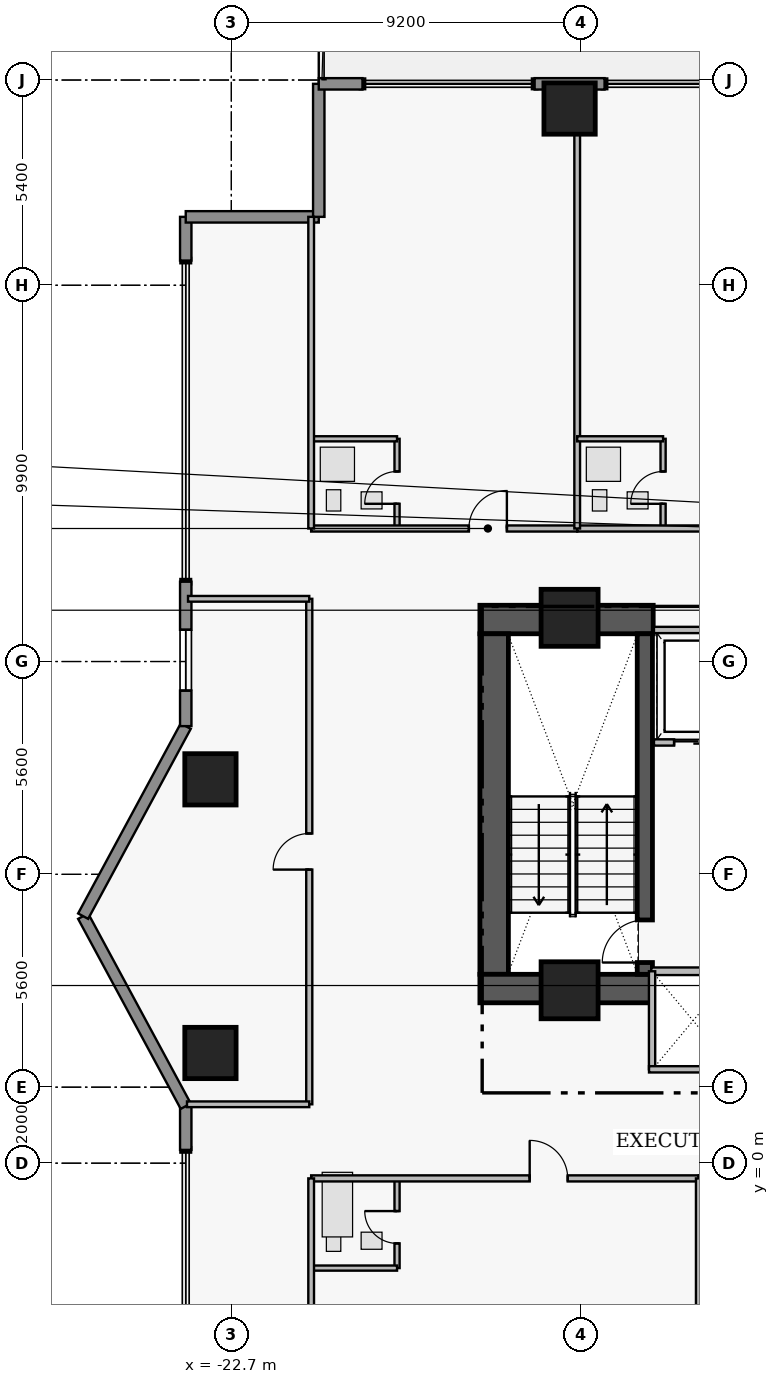
"""IFC4 building model, lengths in metres.
Left out: names, types, materials, properties, quantities, classifications, styles, units other than length and angle.
Written with IfcOpenShell. Run it as: python <this file> out.ifc"""

import sys

from ifc_helpers import new_model, si_unit, direction, frame, frame_2d, origin, origin_2d, place, context, subcontext, project, spatial, rectangle, extrude, element, fill, save


model = new_model("IFC4")
c1 = context("Model", 3, precision=1e-05, world=origin(), true_north=direction((0.0, 1.0)))
c2 = subcontext(c1, "Body", "Model", "MODEL_VIEW")
j1 = project(units=[si_unit("LENGTHUNIT", "METRE"), si_unit("PLANEANGLEUNIT", "RADIAN")], contexts=[c1])
p1 = place(None, origin())
s1 = spatial("IfcSite", under=j1, at=p1, CompositionType="ELEMENT")
p2 = place(p1, origin())
s2 = spatial("IfcBuilding", under=s1, at=p2, CompositionType="ELEMENT")
p3 = place(p2, frame((0.0, 0.0, 132.15)))
s3 = spatial("IfcBuildingStorey", under=s2, at=p3, CompositionType="ELEMENT", Elevation=132.15)
p4 = place(p3, frame((-16.16, 14.305, 0.0), z_axis=(0.0, 0.0, 1.0), x_axis=(1.0, 0.0, 0.0)))
e1 = element("IfcWall", 1, at=p4, inside=s3, PredefinedType="SHEAR", context=c2, shape_type="SweptSolid", body=[
    extrude(rectangle(XDim=4.56, YDim=0.75, at=frame_2d((2.28, 0.0))), origin(), (0.0, 0.0, 1.0), 3.46),
])
p5 = place(p3, frame((-15.785, 4.97, 0.0), z_axis=(0.0, 0.0, 1.0), x_axis=(0.0, 1.0, 0.0)))
e2 = element("IfcWall", 2, at=p5, inside=s3, PredefinedType="SHEAR", context=c2, shape_type="SweptSolid", body=[
    extrude(rectangle(XDim=8.96, YDim=0.75, at=frame_2d((4.48, 0.0))), origin(), (0.0, 0.0, 1.0), 3.46),
])
p6 = place(p3, frame((-16.16, 4.595, 0.0), z_axis=(0.0, 0.0, 1.0), x_axis=(1.0, 0.0, 0.0)))
e3 = element("IfcWall", 3, at=p6, inside=s3, PredefinedType="SHEAR", context=c2, shape_type="SweptSolid", body=[
    extrude(rectangle(XDim=4.56, YDim=0.75, at=frame_2d((2.28, 0.0))), origin(), (0.0, 0.0, 1.0), 3.46),
])
p7 = place(p3, frame((-11.82, 4.97, 0.0), z_axis=(0.0, 0.0, 1.0), x_axis=(0.0, 1.0, 0.0)))
e4 = element("IfcWall", 4, at=p7, inside=s3, PredefinedType="SHEAR", context=c2, shape_type="SweptSolid", body=[
    extrude(rectangle(XDim=8.96, YDim=0.4, at=frame_2d((4.48, 0.0))), origin(), (0.0, 0.0, 1.0), 3.46),
])
p8 = place(p7, frame((0.31, 0.0, 0.0)))
e5 = element("IfcOpeningElement", 5, at=p8, cuts=e4, PredefinedType="OPENING", context=c2, shape_type="SweptSolid", body=[
    extrude(rectangle(XDim=1.12, YDim=2.22, at=frame_2d((0.56, 1.11))), frame((0.0, 0.21, 0.0), z_axis=(0.0, -1.0, 0.0), x_axis=(1.0, 0.0, 0.0)), (0.0, 0.0, 1.0), 0.42),
])
for number, where, z_axis, x_axis in (
    (6, (-13.8, 14.35, 0.0), (0.0, 0.0, 1.0), (1.0, 0.0, 0.0)),
    (7, (-13.8, 4.55, 0.0), (0.0, 0.0, 1.0), (1.0, 0.0, 0.0)),
):
    element("IfcColumn", number, at=place(p3, frame(where, z_axis=z_axis, x_axis=x_axis)), inside=s3, PredefinedType="COLUMN", context=c2, shape_type="SweptSolid", body=[
        extrude(rectangle(XDim=1.5, YDim=1.5, at=origin_2d()), origin(), (0.0, 0.0, 1.0), 3.65),
    ])
for number, where, z_axis, x_axis in (
    (8, (-13.8, 27.75, 0.0), (0.0, 0.0, 1.0), (1.0, 0.0, 0.0)),
    (9, (-23.25, 2.9, 0.0), (0.0, 0.0, 1.0), (1.0, 0.0, 0.0)),
    (10, (-23.25, 10.1, 0.0), (0.0, 0.0, 1.0), (1.0, 0.0, 0.0)),
):
    element("IfcColumn", number, at=place(p3, frame(where, z_axis=z_axis, x_axis=x_axis)), inside=s3, PredefinedType="COLUMN", context=c2, shape_type="SweptSolid", body=[
        extrude(rectangle(XDim=1.35, YDim=1.35, at=origin_2d()), origin(), (0.0, 0.0, 1.0), 3.65),
    ])
p9 = place(p3, frame((-23.9, 0.35, 0.0), z_axis=(0.0, 0.0, 1.0), x_axis=(0.0, 1.0, 0.0)))
e11 = element("IfcWall", 11, at=p9, inside=s3, PredefinedType="STANDARD", context=c2, shape_type="SweptSolid", body=[
    extrude(rectangle(XDim=1.15, YDim=0.3, at=frame_2d((0.575, 0.0))), origin(), (0.0, 0.0, 1.0), 3.43),
])
for number, where, z_axis, x_axis in (
    (12, (-23.9, 1.5, 0.0), (0.0, 0.0, 1.0), (-0.475, 0.88, 0.0)),
    (13, (-26.6, 6.5, 0.0), (0.0, 0.0, 1.0), (0.475, 0.88, 0.0)),
):
    element("IfcWall", number, at=place(p3, frame(where, z_axis=z_axis, x_axis=x_axis)), inside=s3, PredefinedType="STANDARD", context=c2, shape_type="SweptSolid", body=[
        extrude(rectangle(XDim=5.683, YDim=0.3, at=frame_2d((2.841, 0.0))), origin(), (0.0, 0.0, 1.0), 3.43),
    ])
p10 = place(p3, frame((-23.9, 11.5, 0.0), z_axis=(0.0, 0.0, 1.0), x_axis=(0.0, 1.0, 0.0)))
e14 = element("IfcWall", 14, at=p10, inside=s3, PredefinedType="STANDARD", context=c2, shape_type="SweptSolid", body=[
    extrude(rectangle(XDim=3.8, YDim=0.3, at=frame_2d((1.9, 0.0))), origin(), (0.0, 0.0, 1.0), 3.43),
])
p11 = place(p10, frame((0.935, 0.0, 0.85)))
e15 = element("IfcOpeningElement", 15, at=p11, cuts=e14, PredefinedType="OPENING", context=c2, shape_type="SweptSolid", body=[
    extrude(rectangle(XDim=1.6, YDim=1.8, at=frame_2d((0.8, 0.9))), frame((0.0, 0.16, 0.0), z_axis=(0.0, -1.0, 0.0), x_axis=(1.0, 0.0, 0.0)), (0.0, 0.0, 1.0), 0.32),
])
p12 = place(p3, frame((-23.9, 23.75, 0.0), z_axis=(0.0, 0.0, 1.0), x_axis=(0.0, 1.0, 0.0)))
e16 = element("IfcWall", 16, at=p12, inside=s3, PredefinedType="STANDARD", context=c2, shape_type="SweptSolid", body=[
    extrude(rectangle(XDim=1.15, YDim=0.3, at=frame_2d((0.575, 0.0))), origin(), (0.0, 0.0, 1.0), 3.43),
])
for number, where, z_axis, x_axis in (
    (17, (-23.9, 24.9, 0.0), (0.0, 0.0, 1.0), (1.0, 0.0, 0.0)),
    (18, (-20.4, 24.9, 0.0), (0.0, 0.0, 1.0), (0.0, 1.0, 0.0)),
):
    element("IfcWall", number, at=place(p3, frame(where, z_axis=z_axis, x_axis=x_axis)), inside=s3, PredefinedType="STANDARD", context=c2, shape_type="SweptSolid", body=[
        extrude(rectangle(XDim=3.5, YDim=0.3, at=frame_2d((1.75, 0.0))), origin(), (0.0, 0.0, 1.0), 3.43),
    ])
p13 = place(p3, frame((-20.4, 28.4, 0.0), z_axis=(0.0, 0.0, 1.0), x_axis=(1.0, 0.0, 0.0)))
e19 = element("IfcWall", 19, at=p13, inside=s3, PredefinedType="STANDARD", context=c2, shape_type="SweptSolid", body=[
    extrude(rectangle(XDim=1.15, YDim=0.3, at=frame_2d((0.575, 0.0))), origin(), (0.0, 0.0, 1.0), 3.43),
])
p14 = place(p3, frame((-14.72, 28.4, 0.0), z_axis=(0.0, 0.0, 1.0), x_axis=(1.0, 0.0, 0.0)))
e20 = element("IfcWall", 20, at=p14, inside=s3, PredefinedType="STANDARD", context=c2, shape_type="SweptSolid", body=[
    extrude(rectangle(XDim=1.84, YDim=0.3, at=frame_2d((0.92, 0.0))), origin(), (0.0, 0.0, 1.0), 3.43),
])
p15 = place(p3, frame((-11.58, 11.07, 0.0), z_axis=(0.0, 0.0, 1.0), x_axis=(1.0, 0.0, 0.0)))
e21 = element("IfcWall", 21, at=p15, inside=s3, PredefinedType="PARTITIONING", context=c2, shape_type="SweptSolid", body=[
    extrude(rectangle(XDim=2.16, YDim=0.165, at=frame_2d((1.08, 0.0))), origin(), (0.0, 0.0, 1.0), 3.43),
])
p16 = place(p15, frame((0.53, 0.0, 0.0)))
e22 = element("IfcOpeningElement", 22, at=p16, cuts=e21, PredefinedType="OPENING", context=c2, shape_type="SweptSolid", body=[
    extrude(rectangle(XDim=1.15, YDim=2.25, at=frame_2d((0.575, 1.125))), frame((0.0, 0.093, 0.0), z_axis=(0.0, -1.0, 0.0), x_axis=(1.0, 0.0, 0.0)), (0.0, 0.0, 1.0), 0.185),
])
p17 = place(p3, frame((-18.34, 16.7, 0.0), z_axis=(0.0, 0.0, 1.0), x_axis=(0.0, 1.0, 0.0)))
e23 = element("IfcWall", 23, at=p17, inside=s3, PredefinedType="PLUMBINGWALL", context=c2, shape_type="SweptSolid", body=[
    extrude(rectangle(XDim=2.36, YDim=0.135, at=frame_2d((1.18, 0.0))), origin(), (0.0, 0.0, 1.0), 3.43),
])
p18 = place(p17, frame((0.65, 0.0, 0.0)))
e24 = element("IfcOpeningElement", 24, at=p18, cuts=e23, PredefinedType="OPENING", context=c2, shape_type="SweptSolid", body=[
    extrude(rectangle(XDim=0.85, YDim=2.1, at=frame_2d((0.425, 1.05))), frame((0.0, 0.077, 0.0), z_axis=(0.0, -1.0, 0.0), x_axis=(1.0, 0.0, 0.0)), (0.0, 0.0, 1.0), 0.155),
])
p19 = place(p3, frame((-20.6, 16.7, 0.0), z_axis=(0.0, 0.0, 1.0), x_axis=(1.0, 0.0, 0.0)))
e25 = element("IfcWall", 25, at=p19, inside=s3, PredefinedType="PARTITIONING", context=c2, shape_type="SweptSolid", body=[
    extrude(rectangle(XDim=7.0, YDim=0.16, at=frame_2d((3.5, 0.0))), origin(), (0.0, 0.0, 1.0), 3.43),
])
p20 = place(p19, frame((4.15, 0.0, 0.0)))
e26 = element("IfcOpeningElement", 26, at=p20, cuts=e25, PredefinedType="OPENING", context=c2, shape_type="SweptSolid", body=[
    extrude(rectangle(XDim=1.0, YDim=2.15, at=frame_2d((0.5, 1.075))), frame((0.0, 0.09, 0.0), z_axis=(0.0, -1.0, 0.0), x_axis=(1.0, 0.0, 0.0)), (0.0, 0.0, 1.0), 0.18),
])
p21 = place(p3, frame((-11.34, 16.7, 0.0), z_axis=(0.0, 0.0, 1.0), x_axis=(0.0, 1.0, 0.0)))
e27 = element("IfcWall", 27, at=p21, inside=s3, PredefinedType="PLUMBINGWALL", context=c2, shape_type="SweptSolid", body=[
    extrude(rectangle(XDim=2.36, YDim=0.135, at=frame_2d((1.18, 0.0))), origin(), (0.0, 0.0, 1.0), 3.43),
])
p22 = place(p21, frame((0.65, 0.0, 0.0)))
e28 = element("IfcOpeningElement", 28, at=p22, cuts=e27, PredefinedType="OPENING", context=c2, shape_type="SweptSolid", body=[
    extrude(rectangle(XDim=0.85, YDim=2.1, at=frame_2d((0.425, 1.05))), frame((0.0, 0.077, 0.0), z_axis=(0.0, -1.0, 0.0), x_axis=(1.0, 0.0, 0.0)), (0.0, 0.0, 1.0), 0.155),
])
p23 = place(p3, frame((-13.6, 16.7, 0.0), z_axis=(0.0, 0.0, 1.0), x_axis=(1.0, 0.0, 0.0)))
e29 = element("IfcWall", 29, at=p23, inside=s3, PredefinedType="PARTITIONING", context=c2, shape_type="SweptSolid", body=[
    extrude(rectangle(XDim=6.8, YDim=0.16, at=frame_2d((3.4, 0.0))), origin(), (0.0, 0.0, 1.0), 2.973),
])
p24 = place(p23, frame((4.075, 0.0, 0.0)))
e30 = element("IfcOpeningElement", 30, at=p24, cuts=e29, PredefinedType="OPENING", context=c2, shape_type="SweptSolid", body=[
    extrude(rectangle(XDim=0.95, YDim=2.15, at=frame_2d((0.475, 1.075))), frame((0.0, 0.09, 0.0), z_axis=(0.0, -1.0, 0.0), x_axis=(1.0, 0.0, 0.0)), (0.0, 0.0, 1.0), 0.18),
])
p25 = place(p3, frame((-18.34, -2.76, 0.0), z_axis=(0.0, 0.0, 1.0), x_axis=(0.0, 1.0, 0.0)))
e31 = element("IfcWall", 31, at=p25, inside=s3, PredefinedType="PLUMBINGWALL", context=c2, shape_type="SweptSolid", body=[
    extrude(rectangle(XDim=2.36, YDim=0.135, at=frame_2d((1.18, 0.0))), origin(), (0.0, 0.0, 1.0), 3.43),
])
p26 = place(p25, frame((0.65, 0.0, 0.0)))
e32 = element("IfcOpeningElement", 32, at=p26, cuts=e31, PredefinedType="OPENING", context=c2, shape_type="SweptSolid", body=[
    extrude(rectangle(XDim=0.85, YDim=2.1, at=frame_2d((0.425, 1.05))), frame((0.0, 0.077, 0.0), z_axis=(0.0, -1.0, 0.0), x_axis=(1.0, 0.0, 0.0)), (0.0, 0.0, 1.0), 0.155),
])
p27 = place(p3, frame((-20.6, -0.4, 0.0), z_axis=(0.0, 0.0, 1.0), x_axis=(1.0, 0.0, 0.0)))
e33 = element("IfcWall", 33, at=p27, inside=s3, PredefinedType="PARTITIONING", context=c2, shape_type="SweptSolid", body=[
    extrude(rectangle(XDim=10.2, YDim=0.16, at=frame_2d((5.1, 0.0))), origin(), (0.0, 0.0, 1.0), 3.43),
])
p28 = place(p27, frame((5.75, 0.0, 0.0)))
e34 = element("IfcOpeningElement", 34, at=p28, cuts=e33, PredefinedType="OPENING", context=c2, shape_type="SweptSolid", body=[
    extrude(rectangle(XDim=1.0, YDim=2.15, at=frame_2d((0.5, 1.075))), frame((0.0, 0.09, 0.0), z_axis=(0.0, -1.0, 0.0), x_axis=(1.0, 0.0, 0.0)), (0.0, 0.0, 1.0), 0.18),
])
p29 = place(p3, frame((-20.65, 1.55, 0.0), z_axis=(0.0, 0.0, 1.0), x_axis=(0.0, 1.0, 0.0)))
e35 = element("IfcWall", 35, at=p29, inside=s3, PredefinedType="PARTITIONING", context=c2, shape_type="SweptSolid", body=[
    extrude(rectangle(XDim=13.3, YDim=0.16, at=frame_2d((6.65, 0.0))), origin(), (0.0, 0.0, 1.0), 3.43),
])
p30 = place(p29, frame((6.175, 0.0, 0.0)))
e36 = element("IfcOpeningElement", 36, at=p30, cuts=e35, PredefinedType="OPENING", context=c2, shape_type="SweptSolid", body=[
    extrude(rectangle(XDim=0.95, YDim=2.15, at=frame_2d((0.475, 1.075))), frame((0.0, 0.09, 0.0), z_axis=(0.0, -1.0, 0.0), x_axis=(1.0, 0.0, 0.0)), (0.0, 0.0, 1.0), 0.18),
])
p31 = place(p3, frame((-11.65, 5.05, 0.0), z_axis=(0.0, 0.0, 1.0), x_axis=(1.0, 0.0, 0.0)))
e37 = element("IfcWall", 37, at=p31, inside=s3, PredefinedType="PARTITIONING", context=c2, shape_type="SweptSolid", body=[
    extrude(rectangle(XDim=2.85, YDim=0.2, at=frame_2d((1.425, 0.0))), origin(), (0.0, 0.0, 1.0), 3.43),
])
p32 = place(p3, frame((-11.58, 14.03, 0.0), z_axis=(0.0, 0.0, 1.0), x_axis=(1.0, 0.0, 0.0)))
e38 = element("IfcWall", 38, at=p32, inside=s3, PredefinedType="PARTITIONING", context=c2, shape_type="SweptSolid", body=[
    extrude(rectangle(XDim=2.16, YDim=0.165, at=frame_2d((1.08, 0.0))), origin(), (0.0, 0.0, 1.0), 3.43),
])
p33 = place(p3, frame((-11.63, 2.47, 0.0), z_axis=(0.0, 0.0, 1.0), x_axis=(0.0, 1.0, 0.0)))
e39 = element("IfcWall", 39, at=p33, inside=s3, PredefinedType="PARTITIONING", context=c2, shape_type="SweptSolid", body=[
    extrude(rectangle(XDim=2.58, YDim=0.165, at=frame_2d((1.29, 0.0))), origin(), (0.0, 0.0, 1.0), 3.43),
])
p34 = place(p3, frame((-11.71, 2.47, 0.0), z_axis=(0.0, 0.0, 1.0), x_axis=(1.0, 0.0, 0.0)))
e40 = element("IfcWall", 40, at=p34, inside=s3, PredefinedType="PARTITIONING", context=c2, shape_type="SweptSolid", body=[
    extrude(rectangle(XDim=2.31, YDim=0.165, at=frame_2d((1.155, 0.0))), origin(), (0.0, 0.0, 1.0), 2.03),
])
p35 = place(p3, frame((-20.6, 19.06, 0.0), z_axis=(0.0, 0.0, 1.0), x_axis=(1.0, 0.0, 0.0)))
e41 = element("IfcWall", 41, at=p35, inside=s3, PredefinedType="PLUMBINGWALL", context=c2, shape_type="SweptSolid", body=[
    extrude(rectangle(XDim=2.26, YDim=0.135, at=frame_2d((1.13, 0.0))), origin(), (0.0, 0.0, 1.0), 3.43),
])
p36 = place(p3, frame((-20.6, 16.7, 0.0), z_axis=(0.0, 0.0, 1.0), x_axis=(0.0, 1.0, 0.0)))
e42 = element("IfcWall", 42, at=p36, inside=s3, PredefinedType="PARTITIONING", context=c2, shape_type="SweptSolid", body=[
    extrude(rectangle(XDim=8.2, YDim=0.15, at=frame_2d((4.1, 0.0))), origin(), (0.0, 0.0, 1.0), 3.43),
])
p37 = place(p3, frame((-13.6, 16.7, 0.0), z_axis=(0.0, 0.0, 1.0), x_axis=(0.0, 1.0, 0.0)))
e43 = element("IfcWall", 43, at=p37, inside=s3, PredefinedType="PARTITIONING", context=c2, shape_type="SweptSolid", body=[
    extrude(rectangle(XDim=11.62, YDim=0.15, at=frame_2d((5.81, 0.0))), origin(), (0.0, 0.0, 1.0), 2.503),
])
p38 = place(p3, frame((-13.6, 19.06, 0.0), z_axis=(0.0, 0.0, 1.0), x_axis=(1.0, 0.0, 0.0)))
e44 = element("IfcWall", 44, at=p38, inside=s3, PredefinedType="PLUMBINGWALL", context=c2, shape_type="SweptSolid", body=[
    extrude(rectangle(XDim=2.26, YDim=0.135, at=frame_2d((1.13, 0.0))), origin(), (0.0, 0.0, 1.0), 2.973),
])
p39 = place(p3, frame((-20.6, -2.76, 0.0), z_axis=(0.0, 0.0, 1.0), x_axis=(1.0, 0.0, 0.0)))
e45 = element("IfcWall", 45, at=p39, inside=s3, PredefinedType="PLUMBINGWALL", context=c2, shape_type="SweptSolid", body=[
    extrude(rectangle(XDim=2.26, YDim=0.135, at=frame_2d((1.13, 0.0))), origin(), (0.0, 0.0, 1.0), 3.43),
])
p40 = place(p3, frame((-20.6, -11.9, 0.0), z_axis=(0.0, 0.0, 1.0), x_axis=(0.0, 1.0, 0.0)))
e46 = element("IfcWall", 46, at=p40, inside=s3, PredefinedType="PARTITIONING", context=c2, shape_type="SweptSolid", body=[
    extrude(rectangle(XDim=11.5, YDim=0.15, at=frame_2d((5.75, 0.0))), origin(), (0.0, 0.0, 1.0), 3.43),
])
p41 = place(p3, frame((-10.4, -15.32, 0.0), z_axis=(0.0, 0.0, 1.0), x_axis=(0.0, 1.0, 0.0)))
e47 = element("IfcWall", 47, at=p41, inside=s3, PredefinedType="PARTITIONING", context=c2, shape_type="SweptSolid", body=[
    extrude(rectangle(XDim=14.92, YDim=0.15, at=frame_2d((7.46, 0.0))), origin(), (0.0, 0.0, 1.0), 3.43),
])
p42 = place(p3, frame((-23.867, 1.55, 0.0), z_axis=(0.0, 0.0, 1.0), x_axis=(1.0, 0.0, 0.0)))
e48 = element("IfcWall", 48, at=p42, inside=s3, PredefinedType="PARTITIONING", context=c2, shape_type="SweptSolid", body=[
    extrude(rectangle(XDim=3.217, YDim=0.15, at=frame_2d((1.608, 0.0))), origin(), (0.0, 0.0, 1.0), 3.43),
])
p43 = place(p3, frame((-23.84, 14.85, 0.0), z_axis=(0.0, 0.0, 1.0), x_axis=(1.0, 0.0, 0.0)))
e49 = element("IfcWall", 49, at=p43, inside=s3, PredefinedType="PARTITIONING", context=c2, shape_type="SweptSolid", body=[
    extrude(rectangle(XDim=3.19, YDim=0.15, at=frame_2d((1.595, 0.0))), origin(), (0.0, 0.0, 1.0), 3.43),
])
p44 = place(p11, origin())
e50 = element("IfcWindow", 50, at=p44, inside=s3, PartitioningType="SINGLE_PANEL", PredefinedType="WINDOW", context=c2, shape_type="SweptSolid", body=[
    extrude(rectangle(XDim=1.6, YDim=1.8, at=frame_2d((0.8, 0.9))), frame((0.0, 0.03, 0.0), z_axis=(0.0, -1.0, 0.0), x_axis=(1.0, 0.0, 0.0)), (0.0, 0.0, 1.0), 0.06),
])
fill(e15, e50)
p45 = place(p8, origin())
e51 = element("IfcDoor", 51, at=p45, inside=s3, OperationType="SINGLE_SWING_LEFT", PredefinedType="DOOR", context=c2, shape_type="SweptSolid", body=[
    extrude(rectangle(XDim=1.12, YDim=2.22, at=frame_2d((0.56, 1.11))), frame((0.0, 0.025, 0.0), z_axis=(0.0, -1.0, 0.0), x_axis=(1.0, 0.0, 0.0)), (0.0, 0.0, 1.0), 0.05),
])
fill(e5, e51)
p46 = place(p16, origin())
e52 = element("IfcDoor", 52, at=p46, inside=s3, OperationType="SLIDING_TO_LEFT", PredefinedType="DOOR", context=c2, shape_type="SweptSolid", body=[
    extrude(rectangle(XDim=1.15, YDim=2.25, at=frame_2d((0.575, 1.125))), frame((0.0, 0.025, 0.0), z_axis=(0.0, -1.0, 0.0), x_axis=(1.0, 0.0, 0.0)), (0.0, 0.0, 1.0), 0.05),
])
fill(e22, e52)
p47 = place(p18, origin())
e53 = element("IfcDoor", 53, at=p47, inside=s3, OperationType="SINGLE_SWING_LEFT", PredefinedType="DOOR", context=c2, shape_type="SweptSolid", body=[
    extrude(rectangle(XDim=0.85, YDim=2.1, at=frame_2d((0.425, 1.05))), frame((0.0, 0.025, 0.0), z_axis=(0.0, -1.0, 0.0), x_axis=(1.0, 0.0, 0.0)), (0.0, 0.0, 1.0), 0.05),
])
fill(e24, e53)
p48 = place(p20, origin())
e54 = element("IfcDoor", 54, at=p48, inside=s3, OperationType="SINGLE_SWING_RIGHT", PredefinedType="DOOR", context=c2, shape_type="SweptSolid", body=[
    extrude(rectangle(XDim=1.0, YDim=2.15, at=frame_2d((0.5, 1.075))), frame((0.0, 0.025, 0.0), z_axis=(0.0, -1.0, 0.0), x_axis=(1.0, 0.0, 0.0)), (0.0, 0.0, 1.0), 0.05),
])
fill(e26, e54)
p49 = place(p22, origin())
e55 = element("IfcDoor", 55, at=p49, inside=s3, OperationType="SINGLE_SWING_LEFT", PredefinedType="DOOR", context=c2, shape_type="SweptSolid", body=[
    extrude(rectangle(XDim=0.85, YDim=2.1, at=frame_2d((0.425, 1.05))), frame((0.0, 0.025, 0.0), z_axis=(0.0, -1.0, 0.0), x_axis=(1.0, 0.0, 0.0)), (0.0, 0.0, 1.0), 0.05),
])
fill(e28, e55)
p50 = place(p26, origin())
e56 = element("IfcDoor", 56, at=p50, inside=s3, OperationType="SINGLE_SWING_RIGHT", PredefinedType="DOOR", context=c2, shape_type="SweptSolid", body=[
    extrude(rectangle(XDim=0.85, YDim=2.1, at=frame_2d((0.425, 1.05))), frame((0.0, 0.025, 0.0), z_axis=(0.0, -1.0, 0.0), x_axis=(1.0, 0.0, 0.0)), (0.0, 0.0, 1.0), 0.05),
])
fill(e32, e56)
p51 = place(p28, origin())
e57 = element("IfcDoor", 57, at=p51, inside=s3, OperationType="SINGLE_SWING_LEFT", PredefinedType="DOOR", context=c2, shape_type="SweptSolid", body=[
    extrude(rectangle(XDim=1.0, YDim=2.15, at=frame_2d((0.5, 1.075))), frame((0.0, 0.025, 0.0), z_axis=(0.0, -1.0, 0.0), x_axis=(1.0, 0.0, 0.0)), (0.0, 0.0, 1.0), 0.05),
])
fill(e34, e57)
p52 = place(p30, origin())
e58 = element("IfcDoor", 58, at=p52, inside=s3, OperationType="SINGLE_SWING_LEFT", PredefinedType="DOOR", context=c2, shape_type="SweptSolid", body=[
    extrude(rectangle(XDim=0.95, YDim=2.15, at=frame_2d((0.475, 1.075))), frame((0.0, 0.025, 0.0), z_axis=(0.0, -1.0, 0.0), x_axis=(1.0, 0.0, 0.0)), (0.0, 0.0, 1.0), 0.05),
])
fill(e36, e58)
save(model, sys.argv[1])
